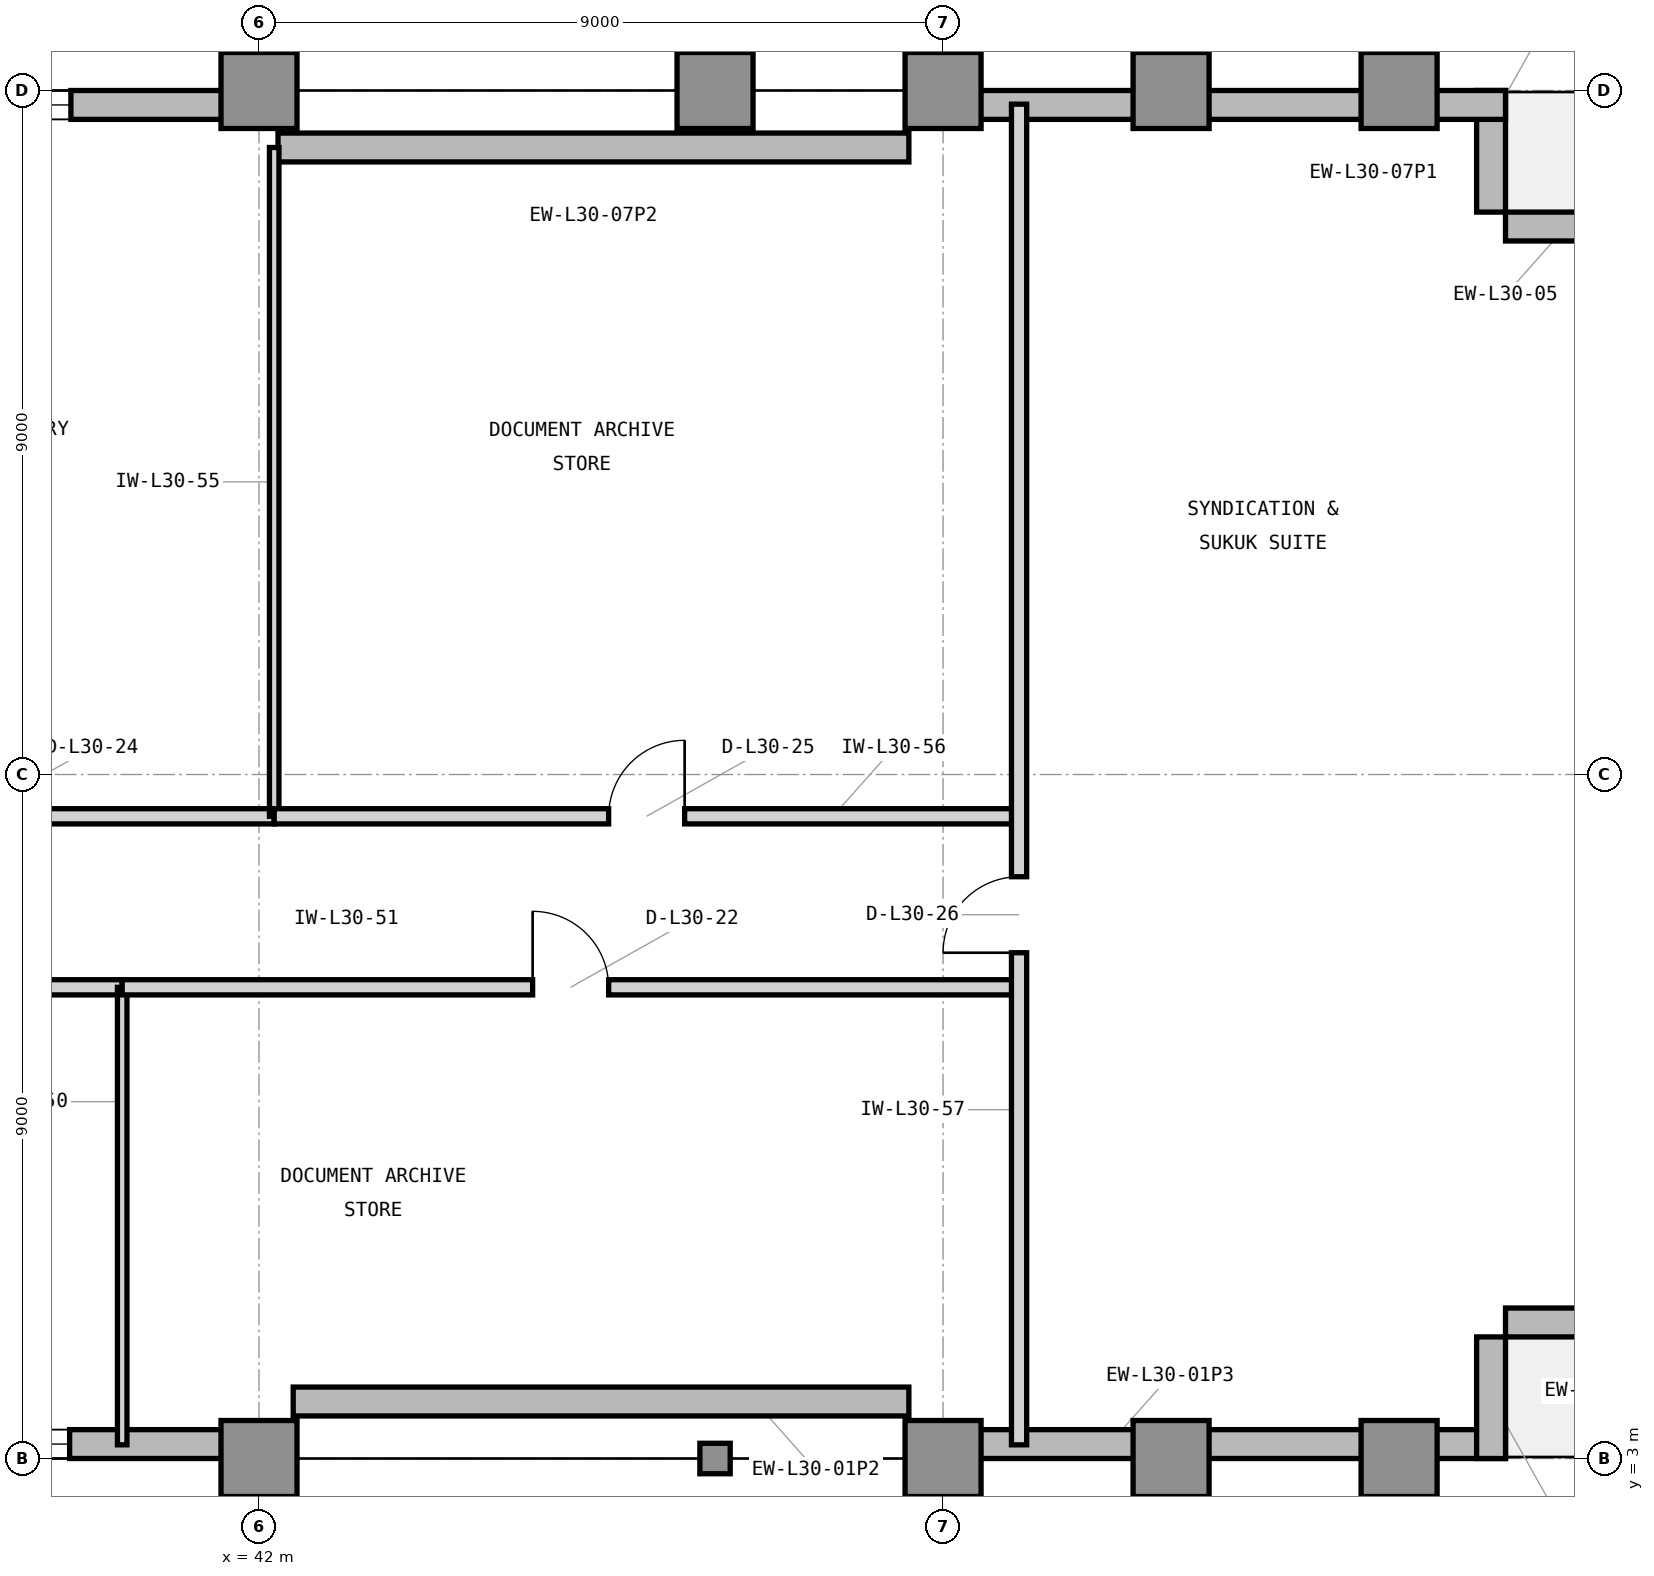
"""IFC4 building model, lengths in metres.
Left out: names, types, materials, properties, quantities, classifications, styles, units other than length and angle.
Written with IfcOpenShell. Run it as: python <this file> out.ifc"""

import sys

from ifc_helpers import new_model, si_unit, direction, frame, frame_2d, origin, origin_2d, place, context, subcontext, project, spatial, rectangle, i_section, extrude, element, fill, save


model = new_model("IFC4")
c1 = context("Model", 3, precision=1e-05, world=origin(), true_north=direction((0.0, 1.0)))
c2 = subcontext(c1, "Body", "Model", "MODEL_VIEW")
j1 = project(units=[si_unit("LENGTHUNIT", "METRE"), si_unit("PLANEANGLEUNIT", "RADIAN")], contexts=[c1])
p1 = place(None, origin())
s1 = spatial("IfcSite", under=j1, at=p1, CompositionType="ELEMENT")
p2 = place(p1, origin())
s2 = spatial("IfcBuilding", under=s1, at=p2, CompositionType="ELEMENT")
p3 = place(p2, frame((0.0, 0.0, 128.4)))
s3 = spatial("IfcBuildingStorey", under=s2, at=p3, CompositionType="ELEMENT", Elevation=128.4)
for number, where, z_axis, x_axis in (
    (1, (42.0, 3.0, 0.0), (0.0, 0.0, 1.0), (1.0, 0.0, 0.0)),
    (2, (42.0, 21.0, 0.0), (0.0, 0.0, 1.0), (1.0, 0.0, 0.0)),
):
    element("IfcColumn", number, at=place(p3, frame(where, z_axis=z_axis, x_axis=x_axis)), inside=s3, PredefinedType="COLUMN", context=c2, shape_type="SweptSolid", body=[
        extrude(rectangle(XDim=1.0, YDim=1.0, at=origin_2d()), origin(), (0.0, 0.0, 1.0), 3.9),
    ])
p4 = place(p3, frame((48.0, 3.0, -0.2), z_axis=(0.0, 0.0, 1.0), x_axis=(1.0, 0.0, 0.0)))
e3 = element("IfcColumn", 3, at=p4, inside=s3, PredefinedType="COLUMN", context=c2, shape_type="SweptSolid", body=[
    extrude(i_section(OverallWidth=0.401, OverallDepth=0.399, WebThickness=0.025, FlangeThickness=0.04, FilletRadius=0.032, at=origin_2d()), origin(), (0.0, 0.0, 1.0), 4.1),
])
for number, where, z_axis, x_axis in (
    (4, (48.0, 21.0, 0.0), (0.0, 0.0, 1.0), (1.0, 0.0, 0.0)),
    (5, (51.0, 3.0, 0.0), (0.0, 0.0, 1.0), (1.0, 0.0, 0.0)),
    (6, (51.0, 21.0, 0.0), (0.0, 0.0, 1.0), (1.0, 0.0, 0.0)),
    (7, (54.0, 3.0, 0.0), (0.0, 0.0, 1.0), (1.0, 0.0, 0.0)),
    (8, (54.0, 21.0, 0.0), (0.0, 0.0, 1.0), (1.0, 0.0, 0.0)),
    (9, (57.0, 3.0, 0.0), (0.0, 0.0, 1.0), (1.0, 0.0, 0.0)),
    (10, (57.0, 21.0, 0.0), (0.0, 0.0, 1.0), (1.0, 0.0, 0.0)),
):
    element("IfcColumn", number, at=place(p3, frame(where, z_axis=z_axis, x_axis=x_axis)), inside=s3, PredefinedType="COLUMN", context=c2, shape_type="SweptSolid", body=[
        extrude(rectangle(XDim=1.0, YDim=1.0, at=origin_2d()), origin(), (0.0, 0.0, 1.0), 3.9),
    ])
p5 = place(p3, frame((23.9, 3.19, 0.0), z_axis=(0.0, 0.0, 1.0), x_axis=(1.0, 0.0, 0.0)))
e11 = element("IfcWall", 11, at=p5, inside=s3, PredefinedType="STANDARD", context=c2, shape_type="SweptSolid", body=[
    extrude(rectangle(XDim=17.65, YDim=0.38, at=frame_2d((8.825, 0.0))), origin(), (0.0, 0.0, 1.0), 3.7),
])
p6 = place(p5, frame((13.808, 0.0, 0.85)))
e12 = element("IfcOpeningElement", 12, at=p6, cuts=e11, PredefinedType="OPENING", context=c2, shape_type="SweptSolid", body=[
    extrude(rectangle(XDim=1.8, YDim=2.25, at=frame_2d((0.9, 1.125))), frame((0.0, 0.2, 0.0), z_axis=(0.0, -1.0, 0.0), x_axis=(1.0, 0.0, 0.0)), (0.0, 0.0, 1.0), 0.4),
])
p7 = place(p5, frame((1.1, 0.0, 0.85)))
e13 = element("IfcOpeningElement", 13, at=p7, cuts=e11, PredefinedType="OPENING", context=c2, shape_type="SweptSolid", body=[
    extrude(rectangle(XDim=1.2, YDim=2.25, at=frame_2d((0.6, 1.125))), frame((0.0, 0.2, 0.0), z_axis=(0.0, -1.0, 0.0), x_axis=(1.0, 0.0, 0.0)), (0.0, 0.0, 1.0), 0.4),
])
p8 = place(p3, frame((42.45, 3.75, 0.0), z_axis=(0.0, 0.0, 1.0), x_axis=(1.0, 0.0, 0.0)))
e14 = element("IfcWall", 14, at=p8, inside=s3, PredefinedType="STANDARD", context=c2, shape_type="SweptSolid", body=[
    extrude(rectangle(XDim=8.1, YDim=0.38, at=frame_2d((4.05, 0.0))), origin(), (0.0, 0.0, 1.0), 3.7),
])
p9 = place(p3, frame((51.45, 3.19, 0.0), z_axis=(0.0, 0.0, 1.0), x_axis=(1.0, 0.0, 0.0)))
e15 = element("IfcWall", 15, at=p9, inside=s3, PredefinedType="STANDARD", context=c2, shape_type="SweptSolid", body=[
    extrude(rectangle(XDim=6.95, YDim=0.38, at=frame_2d((3.475, 0.0))), origin(), (0.0, 0.0, 1.0), 3.7),
])
for number, where, z_axis, x_axis in (
    (16, (58.21, 3.0, 0.0), (0.0, 0.0, 1.0), (0.0, 1.0, 0.0)),
    (17, (58.4, 4.79, 0.0), (0.0, 0.0, 1.0), (1.0, 0.0, 0.0)),
    (18, (60.0, 19.21, 0.0), (0.0, 0.0, 1.0), (-1.0, 0.0, 0.0)),
    (19, (58.21, 19.4, 0.0), (0.0, 0.0, 1.0), (0.0, 1.0, 0.0)),
):
    element("IfcWall", number, at=place(p3, frame(where, z_axis=z_axis, x_axis=x_axis)), inside=s3, PredefinedType="STANDARD", context=c2, shape_type="SweptSolid", body=[
        extrude(rectangle(XDim=1.6, YDim=0.38, at=frame_2d((0.8, 0.0))), origin(), (0.0, 0.0, 1.0), 3.7),
    ])
p10 = place(p3, frame((58.4, 20.81, 0.0), z_axis=(0.0, 0.0, 1.0), x_axis=(-1.0, 0.0, 0.0)))
e20 = element("IfcWall", 20, at=p10, inside=s3, PredefinedType="STANDARD", context=c2, shape_type="SweptSolid", body=[
    extrude(rectangle(XDim=6.95, YDim=0.38, at=frame_2d((3.475, 0.0))), origin(), (0.0, 0.0, 1.0), 3.7),
])
p11 = place(p3, frame((50.55, 20.25, 0.0), z_axis=(0.0, 0.0, 1.0), x_axis=(-1.0, 0.0, 0.0)))
e21 = element("IfcWall", 21, at=p11, inside=s3, PredefinedType="STANDARD", context=c2, shape_type="SweptSolid", body=[
    extrude(rectangle(XDim=8.3, YDim=0.38, at=frame_2d((4.15, 0.0))), origin(), (0.0, 0.0, 1.0), 3.7),
])
p12 = place(p3, frame((41.55, 20.81, 0.0), z_axis=(0.0, 0.0, 1.0), x_axis=(-1.0, 0.0, 0.0)))
e22 = element("IfcWall", 22, at=p12, inside=s3, PredefinedType="STANDARD", context=c2, shape_type="SweptSolid", body=[
    extrude(rectangle(XDim=17.55, YDim=0.38, at=frame_2d((8.775, 0.0))), origin(), (0.0, 0.0, 1.0), 3.7),
])
p13 = place(p12, frame((2.025, 0.0, 0.85)))
e23 = element("IfcOpeningElement", 23, at=p13, cuts=e22, PredefinedType="OPENING", context=c2, shape_type="SweptSolid", body=[
    extrude(rectangle(XDim=1.8, YDim=2.25, at=frame_2d((0.9, 1.125))), frame((0.0, 0.2, 0.0), z_axis=(0.0, -1.0, 0.0), x_axis=(1.0, 0.0, 0.0)), (0.0, 0.0, 1.0), 0.4),
])
p14 = place(p12, frame((15.384, 0.0, 0.85)))
e24 = element("IfcOpeningElement", 24, at=p14, cuts=e22, PredefinedType="OPENING", context=c2, shape_type="SweptSolid", body=[
    extrude(rectangle(XDim=1.2, YDim=2.25, at=frame_2d((0.6, 1.125))), frame((0.0, 0.2, 0.0), z_axis=(0.0, -1.0, 0.0), x_axis=(1.0, 0.0, 0.0)), (0.0, 0.0, 1.0), 0.4),
])
p15 = place(p12, frame((9.854, 0.0, 0.85)))
e25 = element("IfcOpeningElement", 25, at=p15, cuts=e22, PredefinedType="OPENING", context=c2, shape_type="SweptSolid", body=[
    extrude(rectangle(XDim=2.5, YDim=2.25, at=frame_2d((1.25, 1.125))), frame((0.0, 0.2, 0.0), z_axis=(0.0, -1.0, 0.0), x_axis=(1.0, 0.0, 0.0)), (0.0, 0.0, 1.0), 0.4),
])
p16 = place(p3, frame((26.7, 9.2, 0.0), z_axis=(0.0, 0.0, 1.0), x_axis=(1.0, 0.0, 0.0)))
e26 = element("IfcWall", 26, at=p16, inside=s3, PredefinedType="PARTITIONING", context=c2, shape_type="SweptSolid", body=[
    extrude(rectangle(XDim=13.5, YDim=0.2, at=frame_2d((6.75, 0.0))), origin(), (0.0, 0.0, 1.0), 3.69),
])
p17 = place(p16, frame((6.25, 0.0, 0.0)))
e27 = element("IfcOpeningElement", 27, at=p17, cuts=e26, PredefinedType="OPENING", context=c2, shape_type="SweptSolid", body=[
    extrude(rectangle(XDim=1.0, YDim=2.15, at=frame_2d((0.5, 1.075))), frame((0.0, 0.11, 0.0), z_axis=(0.0, -1.0, 0.0), x_axis=(1.0, 0.0, 0.0)), (0.0, 0.0, 1.0), 0.22),
])
p18 = place(p3, frame((40.2, 3.18, 0.0), z_axis=(0.0, 0.0, 1.0), x_axis=(0.0, 1.0, 0.0)))
e28 = element("IfcWall", 28, at=p18, inside=s3, PredefinedType="PARTITIONING", context=c2, shape_type="SweptSolid", body=[
    extrude(rectangle(XDim=6.02, YDim=0.125, at=frame_2d((3.01, 0.0))), origin(), (0.0, 0.0, 1.0), 3.69),
])
p19 = place(p3, frame((40.2, 9.2, 0.0), z_axis=(0.0, 0.0, 1.0), x_axis=(1.0, 0.0, 0.0)))
e29 = element("IfcWall", 29, at=p19, inside=s3, PredefinedType="PARTITIONING", context=c2, shape_type="SweptSolid", body=[
    extrude(rectangle(XDim=11.8, YDim=0.2, at=frame_2d((5.9, 0.0))), origin(), (0.0, 0.0, 1.0), 3.69),
])
p20 = place(p19, frame((5.4, 0.0, 0.0)))
e30 = element("IfcOpeningElement", 30, at=p20, cuts=e29, PredefinedType="OPENING", context=c2, shape_type="SweptSolid", body=[
    extrude(rectangle(XDim=1.0, YDim=2.15, at=frame_2d((0.5, 1.075))), frame((0.0, 0.11, 0.0), z_axis=(0.0, -1.0, 0.0), x_axis=(1.0, 0.0, 0.0)), (0.0, 0.0, 1.0), 0.22),
])
p21 = place(p3, frame((34.2, 11.45, 0.0), z_axis=(0.0, 0.0, 1.0), x_axis=(1.0, 0.0, 0.0)))
e31 = element("IfcWall", 31, at=p21, inside=s3, PredefinedType="PARTITIONING", context=c2, shape_type="SweptSolid", body=[
    extrude(rectangle(XDim=8.0, YDim=0.2, at=frame_2d((4.0, 0.0))), origin(), (0.0, 0.0, 1.0), 3.69),
])
p22 = place(p21, frame((3.5, 0.0, 0.0)))
e32 = element("IfcOpeningElement", 32, at=p22, cuts=e31, PredefinedType="OPENING", context=c2, shape_type="SweptSolid", body=[
    extrude(rectangle(XDim=1.0, YDim=2.15, at=frame_2d((0.5, 1.075))), frame((0.0, 0.11, 0.0), z_axis=(0.0, -1.0, 0.0), x_axis=(1.0, 0.0, 0.0)), (0.0, 0.0, 1.0), 0.22),
])
p23 = place(p3, frame((42.2, 11.45, 0.0), z_axis=(0.0, 0.0, 1.0), x_axis=(0.0, 1.0, 0.0)))
e33 = element("IfcWall", 33, at=p23, inside=s3, PredefinedType="PARTITIONING", context=c2, shape_type="SweptSolid", body=[
    extrude(rectangle(XDim=8.8, YDim=0.125, at=frame_2d((4.4, 0.0))), origin(), (0.0, 0.0, 1.0), 3.69),
])
p24 = place(p3, frame((42.2, 11.45, 0.0), z_axis=(0.0, 0.0, 1.0), x_axis=(1.0, 0.0, 0.0)))
e34 = element("IfcWall", 34, at=p24, inside=s3, PredefinedType="PARTITIONING", context=c2, shape_type="SweptSolid", body=[
    extrude(rectangle(XDim=9.8, YDim=0.2, at=frame_2d((4.9, 0.0))), origin(), (0.0, 0.0, 1.0), 3.69),
])
p25 = place(p24, frame((4.4, 0.0, 0.0)))
e35 = element("IfcOpeningElement", 35, at=p25, cuts=e34, PredefinedType="OPENING", context=c2, shape_type="SweptSolid", body=[
    extrude(rectangle(XDim=1.0, YDim=2.15, at=frame_2d((0.5, 1.075))), frame((0.0, 0.11, 0.0), z_axis=(0.0, -1.0, 0.0), x_axis=(1.0, 0.0, 0.0)), (0.0, 0.0, 1.0), 0.22),
])
p26 = place(p3, frame((52.0, 3.18, 0.0), z_axis=(0.0, 0.0, 1.0), x_axis=(0.0, 1.0, 0.0)))
e36 = element("IfcWall", 36, at=p26, inside=s3, PredefinedType="PARTITIONING", context=c2, shape_type="SweptSolid", body=[
    extrude(rectangle(XDim=17.64, YDim=0.2, at=frame_2d((8.82, 0.0))), origin(), (0.0, 0.0, 1.0), 3.69),
])
p27 = place(p26, frame((6.475, 0.0, 0.0)))
e37 = element("IfcOpeningElement", 37, at=p27, cuts=e36, PredefinedType="OPENING", context=c2, shape_type="SweptSolid", body=[
    extrude(rectangle(XDim=1.0, YDim=2.15, at=frame_2d((0.5, 1.075))), frame((0.0, 0.11, 0.0), z_axis=(0.0, -1.0, 0.0), x_axis=(1.0, 0.0, 0.0)), (0.0, 0.0, 1.0), 0.22),
])
p28 = place(p6, origin())
e38 = element("IfcWindow", 38, at=p28, inside=s3, PartitioningType="SINGLE_PANEL", PredefinedType="WINDOW", context=c2, shape_type="SweptSolid", body=[
    extrude(rectangle(XDim=1.8, YDim=2.25, at=frame_2d((0.9, 1.125))), frame((0.0, 0.11, 0.0), z_axis=(0.0, -1.0, 0.0), x_axis=(1.0, 0.0, 0.0)), (0.0, 0.0, 1.0), 0.06),
])
fill(e12, e38)
p29 = place(p13, origin())
e39 = element("IfcWindow", 39, at=p29, inside=s3, PartitioningType="SINGLE_PANEL", PredefinedType="WINDOW", context=c2, shape_type="SweptSolid", body=[
    extrude(rectangle(XDim=1.8, YDim=2.25, at=frame_2d((0.9, 1.125))), frame((0.0, 0.11, 0.0), z_axis=(0.0, -1.0, 0.0), x_axis=(1.0, 0.0, 0.0)), (0.0, 0.0, 1.0), 0.06),
])
fill(e23, e39)
p30 = place(p20, origin())
e40 = element("IfcDoor", 40, at=p30, inside=s3, OperationType="SINGLE_SWING_LEFT", PredefinedType="DOOR", context=c2, shape_type="SweptSolid", body=[
    extrude(rectangle(XDim=1.0, YDim=2.15, at=frame_2d((0.5, 1.075))), frame((0.0, 0.025, 0.0), z_axis=(0.0, -1.0, 0.0), x_axis=(1.0, 0.0, 0.0)), (0.0, 0.0, 1.0), 0.05),
])
fill(e30, e40)
p31 = place(p25, origin())
e41 = element("IfcDoor", 41, at=p31, inside=s3, OperationType="SINGLE_SWING_RIGHT", PredefinedType="DOOR", context=c2, shape_type="SweptSolid", body=[
    extrude(rectangle(XDim=1.0, YDim=2.15, at=frame_2d((0.5, 1.075))), frame((0.0, 0.025, 0.0), z_axis=(0.0, -1.0, 0.0), x_axis=(1.0, 0.0, 0.0)), (0.0, 0.0, 1.0), 0.05),
])
fill(e35, e41)
p32 = place(p27, origin())
e42 = element("IfcDoor", 42, at=p32, inside=s3, OperationType="SINGLE_SWING_LEFT", PredefinedType="DOOR", context=c2, shape_type="SweptSolid", body=[
    extrude(rectangle(XDim=1.0, YDim=2.15, at=frame_2d((0.5, 1.075))), frame((0.0, 0.025, 0.0), z_axis=(0.0, -1.0, 0.0), x_axis=(1.0, 0.0, 0.0)), (0.0, 0.0, 1.0), 0.05),
])
fill(e37, e42)
save(model, sys.argv[1])
